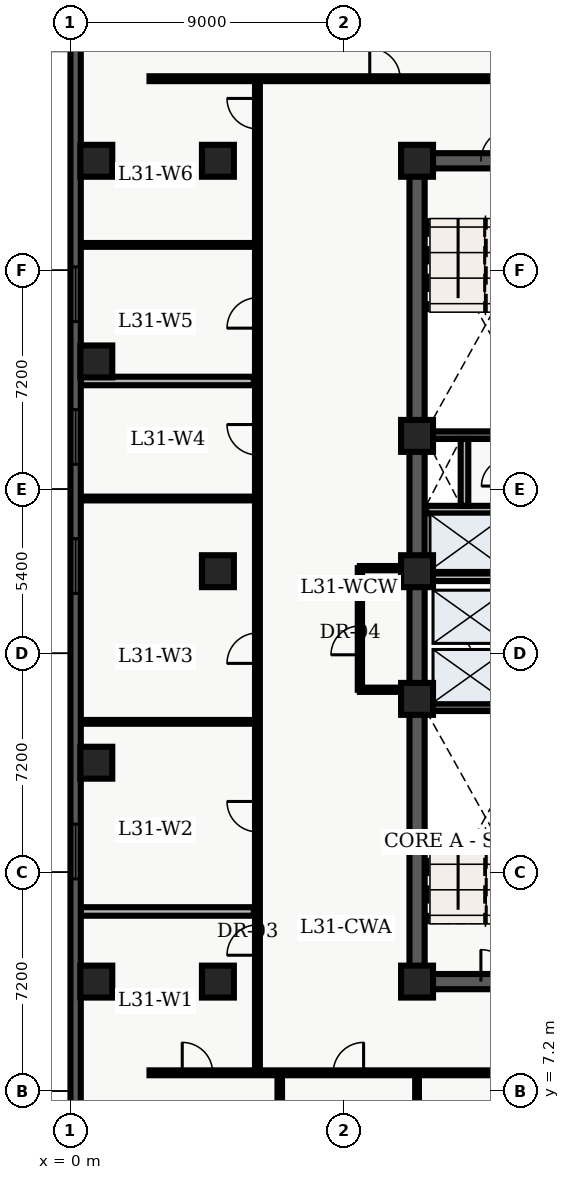
"""IFC4 building model, lengths in metres.
Left out: names, types, materials, properties, quantities, classifications, styles, units other than length and angle.
Written with IfcOpenShell. Run it as: python <this file> out.ifc"""

import sys

from ifc_helpers import new_model, entity, si_unit, converted_unit, direction, frame, origin_with_axes, origin_2d_with_axis, place, context, subcontext, project, spatial, polyline, rectangle, outline, extrude, element, fill, save


model = new_model("IFC4")
c1 = context("Model", 3, precision=1e-05, world=origin_with_axes(), true_north=direction((0.0, 1.0)))
c2 = subcontext(c1, "Body", "Model", "MODEL_VIEW")
j1 = project(units=[si_unit("LENGTHUNIT", "METRE"), converted_unit("PLANEANGLEUNIT", "DEGREE", entity("IfcPlaneAngleMeasure", 0.017), si_unit("PLANEANGLEUNIT", "RADIAN"), dimensions=[0, 0, 0, 0, 0, 0, 0])], contexts=[c1])
p1 = place(None, origin_with_axes())
s1 = spatial("IfcSite", under=j1, at=p1, CompositionType="ELEMENT")
p2 = place(p1, origin_with_axes())
s2 = spatial("IfcBuilding", under=s1, at=p2, CompositionType="ELEMENT")
p3 = place(p2, frame((0.0, 0.0, 129.0), z_axis=(0.0, 0.0, 1.0), x_axis=(1.0, 0.0, 0.0)))
s3 = spatial("IfcBuildingStorey", under=s2, at=p3, CompositionType="ELEMENT", Elevation=129.0)
p4 = place(p3, frame((11.4, 10.8, 0.0), z_axis=(0.0, 0.0, 1.0), x_axis=(0.0, 1.0, 0.0)))
e1 = element("IfcWall", 1, at=p4, inside=s3, PredefinedType="SHEAR", context=c2, shape_type="SweptSolid", body=[
    extrude(outline(polyline([(0.0, -0.25), (27.0, -0.25), (27.0, 0.25), (0.0, 0.25), (0.0, -0.25)])), origin_with_axes(), (0.0, 0.0, 1.0), 3.66),
])
p5 = place(p3, frame((11.4, 10.8, 0.0), z_axis=(0.0, 0.0, 1.0), x_axis=(1.0, 0.0, 0.0)))
e2 = element("IfcWall", 2, at=p5, inside=s3, PredefinedType="SHEAR", context=c2, shape_type="SweptSolid", body=[
    extrude(outline(polyline([(0.0, -0.25), (7.2, -0.25), (7.2, 0.25), (0.0, 0.25), (0.0, -0.25)])), origin_with_axes(), (0.0, 0.0, 1.0), 3.66),
])
p6 = place(p5, frame((2.625, 0.0, 0.0), z_axis=(0.0, 0.0, 1.0), x_axis=(1.0, 0.0, 0.0)))
e3 = element("IfcOpeningElement", 3, at=p6, cuts=e2, PredefinedType="OPENING", context=c2, shape_type="SweptSolid", body=[
    extrude(rectangle(XDim=1.05, YDim=0.52, at=origin_2d_with_axis()), origin_with_axes(), (0.0, 0.0, 1.0), 2.15),
])
p7 = place(p3, frame((11.4, 37.8, 0.0), z_axis=(0.0, 0.0, 1.0), x_axis=(1.0, 0.0, 0.0)))
e4 = element("IfcWall", 4, at=p7, inside=s3, PredefinedType="SHEAR", context=c2, shape_type="SweptSolid", body=[
    extrude(outline(polyline([(0.0, -0.25), (7.2, -0.25), (7.2, 0.25), (0.0, 0.25), (0.0, -0.25)])), origin_with_axes(), (0.0, 0.0, 1.0), 3.66),
])
p8 = place(p7, frame((2.625, 0.0, 0.0), z_axis=(0.0, 0.0, 1.0), x_axis=(1.0, 0.0, 0.0)))
e5 = element("IfcOpeningElement", 5, at=p8, cuts=e4, PredefinedType="OPENING", context=c2, shape_type="SweptSolid", body=[
    extrude(rectangle(XDim=1.05, YDim=0.52, at=origin_2d_with_axis()), origin_with_axes(), (0.0, 0.0, 1.0), 2.15),
])
for number, where, z_axis, x_axis in (
    (6, (11.65, 19.825, 0.0), (0.0, 0.0, 1.0), (1.0, 0.0, 0.0)),
    (7, (11.65, 28.775, 0.0), (0.0, 0.0, 1.0), (1.0, 0.0, 0.0)),
):
    element("IfcWall", number, at=place(p3, frame(where, z_axis=z_axis, x_axis=x_axis)), inside=s3, PredefinedType="SHEAR", context=c2, shape_type="SweptSolid", body=[
        extrude(outline(polyline([(0.0, -0.125), (6.7, -0.125), (6.7, 0.125), (0.0, 0.125), (0.0, -0.125)])), origin_with_axes(), (0.0, 0.0, 1.0), 3.66),
    ])
p9 = place(p3, frame((11.7, 24.1, 0.0), z_axis=(0.0, 0.0, 1.0), x_axis=(1.0, 0.0, 0.0)))
e8 = element("IfcWall", 8, at=p9, inside=s3, PredefinedType="SOLIDWALL", context=c2, shape_type="SweptSolid", body=[
    extrude(outline(polyline([(0.0, -0.125), (6.6, -0.125), (6.6, 0.125), (0.0, 0.125), (0.0, -0.125)])), origin_with_axes(), (0.0, 0.0, 1.0), 2.7),
])
p10 = place(p9, frame((3.75, 0.0, 0.0), z_axis=(0.0, 0.0, 1.0), x_axis=(1.0, 0.0, 0.0)))
e9 = element("IfcOpeningElement", 9, at=p10, cuts=e8, PredefinedType="OPENING", context=c2, shape_type="SweptSolid", body=[
    extrude(rectangle(XDim=0.9, YDim=0.27, at=origin_2d_with_axis()), origin_with_axes(), (0.0, 0.0, 1.0), 2.15),
])
p11 = place(p3, frame((11.7, 26.325, 0.0), z_axis=(0.0, 0.0, 1.0), x_axis=(1.0, 0.0, 0.0)))
e10 = element("IfcWall", 10, at=p11, inside=s3, PredefinedType="SOLIDWALL", context=c2, shape_type="SweptSolid", body=[
    extrude(outline(polyline([(0.0, -0.125), (6.6, -0.125), (6.6, 0.125), (0.0, 0.125), (0.0, -0.125)])), origin_with_axes(), (0.0, 0.0, 1.0), 2.7),
])
p12 = place(p11, frame((3.5, 0.0, 0.0), z_axis=(0.0, 0.0, 1.0), x_axis=(1.0, 0.0, 0.0)))
e11 = element("IfcOpeningElement", 11, at=p12, cuts=e10, PredefinedType="OPENING", context=c2, shape_type="SweptSolid", body=[
    extrude(rectangle(XDim=0.9, YDim=0.27, at=origin_2d_with_axis()), origin_with_axes(), (0.0, 0.0, 1.0), 2.15),
])
p13 = place(p3, frame((12.96, 26.45, 0.0), z_axis=(0.0, 0.0, 1.0), x_axis=(0.0, 1.0, 0.0)))
e12 = element("IfcWall", 12, at=p13, inside=s3, PredefinedType="SOLIDWALL", context=c2, shape_type="SweptSolid", body=[
    extrude(outline(polyline([(0.0, -0.125), (2.2, -0.125), (2.2, 0.125), (0.0, 0.125), (0.0, -0.125)])), origin_with_axes(), (0.0, 0.0, 1.0), 2.7),
])
for number, where, z_axis, x_axis in (
    (13, (11.4, 10.8, 0.0), (0.0, 0.0, 1.0), (1.0, 0.0, 0.0)),
    (14, (11.4, 20.1, 0.0), (0.0, 0.0, 1.0), (1.0, 0.0, 0.0)),
    (15, (11.4, 24.3, 0.0), (0.0, 0.0, 1.0), (1.0, 0.0, 0.0)),
    (16, (11.4, 28.75, 0.0), (0.0, 0.0, 1.0), (1.0, 0.0, 0.0)),
    (17, (11.4, 37.8, 0.0), (0.0, 0.0, 1.0), (1.0, 0.0, 0.0)),
    (18, (4.85, 10.8, 0.0), (0.0, 0.0, 1.0), (1.0, 0.0, 0.0)),
    (19, (4.85, 24.3, 0.0), (0.0, 0.0, 1.0), (1.0, 0.0, 0.0)),
    (20, (4.85, 37.8, 0.0), (0.0, 0.0, 1.0), (1.0, 0.0, 0.0)),
    (21, (0.85, 10.8, 0.0), (0.0, 0.0, 1.0), (1.0, 0.0, 0.0)),
    (22, (0.85, 18.0, 0.0), (0.0, 0.0, 1.0), (1.0, 0.0, 0.0)),
    (23, (0.85, 31.2, 0.0), (0.0, 0.0, 1.0), (1.0, 0.0, 0.0)),
    (24, (0.85, 37.8, 0.0), (0.0, 0.0, 1.0), (1.0, 0.0, 0.0)),
):
    element("IfcColumn", number, at=place(p3, frame(where, z_axis=z_axis, x_axis=x_axis)), inside=s3, PredefinedType="COLUMN", context=c2, shape_type="SweptSolid", body=[
        extrude(rectangle(XDim=1.05, YDim=1.05, at=origin_2d_with_axis()), origin_with_axes(), (0.0, 0.0, 1.0), 3.9),
    ])
p14 = place(p3, frame((9.52, 20.4, 0.0), z_axis=(0.0, 0.0, 1.0), x_axis=(0.0, 1.0, 0.0)))
e25 = element("IfcWall", 25, at=p14, inside=s3, PredefinedType="PARTITIONING", context=c2, shape_type="SweptSolid", body=[
    extrude(outline(polyline([(0.0, -0.07), (4.0, -0.07), (4.0, 0.07), (0.0, 0.07), (0.0, -0.07)])), origin_with_axes(), (0.0, 0.0, 1.0), 2.7),
])
p15 = place(p14, frame((1.625, 0.0, 0.0), z_axis=(0.0, 0.0, 1.0), x_axis=(1.0, 0.0, 0.0)))
e26 = element("IfcOpeningElement", 26, at=p15, cuts=e25, PredefinedType="OPENING", context=c2, shape_type="SweptSolid", body=[
    extrude(rectangle(XDim=0.95, YDim=0.16, at=origin_2d_with_axis()), origin_with_axes(), (0.0, 0.0, 1.0), 2.15),
])
for number, where, z_axis, x_axis in (
    (27, (9.52, 20.4, 0.0), (0.0, 0.0, 1.0), (1.0, 0.0, 0.0)),
    (28, (9.52, 24.4, 0.0), (0.0, 0.0, 1.0), (1.0, 0.0, 0.0)),
):
    element("IfcWall", number, at=place(p3, frame(where, z_axis=z_axis, x_axis=x_axis)), inside=s3, PredefinedType="PARTITIONING", context=c2, shape_type="SweptSolid", body=[
        extrude(outline(polyline([(0.0, -0.07), (1.58, -0.07), (1.58, 0.07), (0.0, 0.07), (0.0, -0.07)])), origin_with_axes(), (0.0, 0.0, 1.0), 2.7),
    ])
p16 = place(p3, frame((2.6, 7.8, 0.0), z_axis=(0.0, 0.0, 1.0), x_axis=(1.0, 0.0, 0.0)))
e29 = element("IfcWall", 29, at=p16, inside=s3, PredefinedType="PARTITIONING", context=c2, shape_type="SweptSolid", body=[
    extrude(outline(polyline([(0.0, -0.08), (18.55, -0.08), (18.55, 0.08), (0.0, 0.08), (0.0, -0.08)])), origin_with_axes(), (0.0, 0.0, 1.0), 2.7),
])
p17 = place(p16, frame((1.577, 0.0, 0.0), z_axis=(0.0, 0.0, 1.0), x_axis=(1.0, 0.0, 0.0)))
e30 = element("IfcOpeningElement", 30, at=p17, cuts=e29, PredefinedType="OPENING", context=c2, shape_type="SweptSolid", body=[
    extrude(rectangle(XDim=1.0, YDim=0.18, at=origin_2d_with_axis()), origin_with_axes(), (0.0, 0.0, 1.0), 2.15),
])
p18 = place(p16, frame((6.542, 0.0, 0.0), z_axis=(0.0, 0.0, 1.0), x_axis=(1.0, 0.0, 0.0)))
e31 = element("IfcOpeningElement", 31, at=p18, cuts=e29, PredefinedType="OPENING", context=c2, shape_type="SweptSolid", body=[
    extrude(rectangle(XDim=1.0, YDim=0.18, at=origin_2d_with_axis()), origin_with_axes(), (0.0, 0.0, 1.0), 2.15),
])
p19 = place(p16, frame((11.931, 0.0, 0.0), z_axis=(0.0, 0.0, 1.0), x_axis=(1.0, 0.0, 0.0)))
e32 = element("IfcOpeningElement", 32, at=p19, cuts=e29, PredefinedType="OPENING", context=c2, shape_type="SweptSolid", body=[
    extrude(rectangle(XDim=1.0, YDim=0.18, at=origin_2d_with_axis()), origin_with_axes(), (0.0, 0.0, 1.0), 2.15),
])
p20 = place(p16, frame((16.502, 0.0, 0.0), z_axis=(0.0, 0.0, 1.0), x_axis=(1.0, 0.0, 0.0)))
e33 = element("IfcOpeningElement", 33, at=p20, cuts=e29, PredefinedType="OPENING", context=c2, shape_type="SweptSolid", body=[
    extrude(rectangle(XDim=1.0, YDim=0.18, at=origin_2d_with_axis()), origin_with_axes(), (0.0, 0.0, 1.0), 2.15),
])
p21 = place(p3, frame((2.6, 40.5, 0.0), z_axis=(0.0, 0.0, 1.0), x_axis=(1.0, 0.0, 0.0)))
e34 = element("IfcWall", 34, at=p21, inside=s3, PredefinedType="PARTITIONING", context=c2, shape_type="SweptSolid", body=[
    extrude(outline(polyline([(0.0, -0.08), (18.693, -0.08), (18.693, 0.08), (0.0, 0.08), (0.0, -0.08)])), origin_with_axes(), (0.0, 0.0, 1.0), 2.7),
])
p22 = place(p21, frame((7.744, 0.0, 0.0), z_axis=(0.0, 0.0, 1.0), x_axis=(1.0, 0.0, 0.0)))
e35 = element("IfcOpeningElement", 35, at=p22, cuts=e34, PredefinedType="OPENING", context=c2, shape_type="SweptSolid", body=[
    extrude(rectangle(XDim=1.0, YDim=0.18, at=origin_2d_with_axis()), origin_with_axes(), (0.0, 0.0, 1.0), 2.15),
])
p23 = place(p3, frame((6.15, 7.8, 0.0), z_axis=(0.0, 0.0, 1.0), x_axis=(0.0, 1.0, 0.0)))
e36 = element("IfcWall", 36, at=p23, inside=s3, PredefinedType="PARTITIONING", context=c2, shape_type="SweptSolid", body=[
    extrude(outline(polyline([(0.0, -0.08), (32.7, -0.08), (32.7, 0.08), (0.0, 0.08), (0.0, -0.08)])), origin_with_axes(), (0.0, 0.0, 1.0), 2.7),
])
p24 = place(p23, frame((4.368, 0.0, 0.0), z_axis=(0.0, 0.0, 1.0), x_axis=(1.0, 0.0, 0.0)))
e37 = element("IfcOpeningElement", 37, at=p24, cuts=e36, PredefinedType="OPENING", context=c2, shape_type="SweptSolid", body=[
    extrude(rectangle(XDim=1.0, YDim=0.18, at=origin_2d_with_axis()), origin_with_axes(), (0.0, 0.0, 1.0), 2.15),
])
p25 = place(p23, frame((8.425, 0.0, 0.0), z_axis=(0.0, 0.0, 1.0), x_axis=(1.0, 0.0, 0.0)))
e38 = element("IfcOpeningElement", 38, at=p25, cuts=e36, PredefinedType="OPENING", context=c2, shape_type="SweptSolid", body=[
    extrude(rectangle(XDim=1.0, YDim=0.18, at=origin_2d_with_axis()), origin_with_axes(), (0.0, 0.0, 1.0), 2.15),
])
p26 = place(p23, frame((13.968, 0.0, 0.0), z_axis=(0.0, 0.0, 1.0), x_axis=(1.0, 0.0, 0.0)))
e39 = element("IfcOpeningElement", 39, at=p26, cuts=e36, PredefinedType="OPENING", context=c2, shape_type="SweptSolid", body=[
    extrude(rectangle(XDim=1.0, YDim=0.18, at=origin_2d_with_axis()), origin_with_axes(), (0.0, 0.0, 1.0), 2.15),
])
p27 = place(p23, frame((20.824, 0.0, 0.0), z_axis=(0.0, 0.0, 1.0), x_axis=(1.0, 0.0, 0.0)))
e40 = element("IfcOpeningElement", 40, at=p27, cuts=e36, PredefinedType="OPENING", context=c2, shape_type="SweptSolid", body=[
    extrude(rectangle(XDim=1.0, YDim=0.18, at=origin_2d_with_axis()), origin_with_axes(), (0.0, 0.0, 1.0), 2.15),
])
p28 = place(p23, frame((24.995, 0.0, 0.0), z_axis=(0.0, 0.0, 1.0), x_axis=(1.0, 0.0, 0.0)))
e41 = element("IfcOpeningElement", 41, at=p28, cuts=e36, PredefinedType="OPENING", context=c2, shape_type="SweptSolid", body=[
    extrude(rectangle(XDim=1.0, YDim=0.18, at=origin_2d_with_axis()), origin_with_axes(), (0.0, 0.0, 1.0), 2.15),
])
p29 = place(p23, frame((31.551, 0.0, 0.0), z_axis=(0.0, 0.0, 1.0), x_axis=(1.0, 0.0, 0.0)))
e42 = element("IfcOpeningElement", 42, at=p29, cuts=e36, PredefinedType="OPENING", context=c2, shape_type="SweptSolid", body=[
    extrude(rectangle(XDim=1.0, YDim=0.18, at=origin_2d_with_axis()), origin_with_axes(), (0.0, 0.0, 1.0), 2.15),
])
p30 = place(p3, frame((0.335, 13.107, 0.0), z_axis=(0.0, 0.0, 1.0), x_axis=(1.0, 0.0, 0.0)))
e43 = element("IfcWall", 43, at=p30, inside=s3, PredefinedType="PARTITIONING", context=c2, shape_type="SweptSolid", body=[
    extrude(outline(polyline([(0.0, -0.14), (5.695, -0.14), (5.695, 0.14), (0.0, 0.14), (0.0, -0.14)])), origin_with_axes(), (0.0, 0.0, 1.0), 2.7),
])
for number, where, z_axis, x_axis in (
    (44, (0.335, 19.344, 0.0), (0.0, 0.0, 1.0), (1.0, 0.0, 0.0)),
    (45, (0.335, 26.691, 0.0), (0.0, 0.0, 1.0), (1.0, 0.0, 0.0)),
):
    element("IfcWall", number, at=place(p3, frame(where, z_axis=z_axis, x_axis=x_axis)), inside=s3, PredefinedType="PARTITIONING", context=c2, shape_type="SweptSolid", body=[
        extrude(outline(polyline([(0.0, -0.062), (5.695, -0.062), (5.695, 0.062), (0.0, 0.062), (0.0, -0.062)])), origin_with_axes(), (0.0, 0.0, 1.0), 2.7),
    ])
p31 = place(p3, frame((0.335, 30.557, 0.0), z_axis=(0.0, 0.0, 1.0), x_axis=(1.0, 0.0, 0.0)))
e46 = element("IfcWall", 46, at=p31, inside=s3, PredefinedType="PARTITIONING", context=c2, shape_type="SweptSolid", body=[
    extrude(outline(polyline([(0.0, -0.14), (5.695, -0.14), (5.695, 0.14), (0.0, 0.14), (0.0, -0.14)])), origin_with_axes(), (0.0, 0.0, 1.0), 2.7),
])
p32 = place(p3, frame((0.335, 35.033, 0.0), z_axis=(0.0, 0.0, 1.0), x_axis=(1.0, 0.0, 0.0)))
e47 = element("IfcWall", 47, at=p32, inside=s3, PredefinedType="PARTITIONING", context=c2, shape_type="SweptSolid", body=[
    extrude(outline(polyline([(0.0, -0.062), (5.695, -0.062), (5.695, 0.062), (0.0, 0.062), (0.0, -0.062)])), origin_with_axes(), (0.0, 0.0, 1.0), 2.7),
])
p33 = place(p3, frame((6.884, 0.335, 0.0), z_axis=(0.0, 0.0, 1.0), x_axis=(0.0, 1.0, 0.0)))
e48 = element("IfcWall", 48, at=p33, inside=s3, PredefinedType="PARTITIONING", context=c2, shape_type="SweptSolid", body=[
    extrude(outline(polyline([(0.0, -0.075), (7.365, -0.075), (7.365, 0.075), (0.0, 0.075), (0.0, -0.075)])), origin_with_axes(), (0.0, 0.0, 1.0), 2.7),
])
p34 = place(p3, frame((11.4, 0.335, 0.0), z_axis=(0.0, 0.0, 1.0), x_axis=(0.0, 1.0, 0.0)))
e49 = element("IfcWall", 49, at=p34, inside=s3, PredefinedType="PARTITIONING", context=c2, shape_type="SweptSolid", body=[
    extrude(outline(polyline([(0.0, -0.062), (7.365, -0.062), (7.365, 0.062), (0.0, 0.062), (0.0, -0.062)])), origin_with_axes(), (0.0, 0.0, 1.0), 2.7),
])
p35 = place(p3, frame((0.17, 2.74, 0.0), z_axis=(0.0, 0.0, 1.0), x_axis=(0.0, 1.0, 0.0)))
e50 = element("IfcWall", 50, at=p35, inside=s3, PredefinedType="SOLIDWALL", context=c2, shape_type="SweptSolid", body=[
    extrude(outline(polyline([(0.0, -0.17), (43.46, -0.17), (43.46, 0.17), (0.0, 0.17), (0.0, -0.17)])), origin_with_axes(), (0.0, 0.0, 1.0), 3.66),
])
p36 = place(p35, frame((2.948, 0.0, 0.45), z_axis=(0.0, 0.0, 1.0), x_axis=(1.0, 0.0, 0.0)))
e51 = element("IfcOpeningElement", 51, at=p36, cuts=e50, PredefinedType="OPENING", context=c2, shape_type="SweptSolid", body=[
    extrude(rectangle(XDim=1.8, YDim=0.36, at=origin_2d_with_axis()), origin_with_axes(), (0.0, 0.0, 1.0), 2.1),
])
p37 = place(p35, frame((12.339, 0.0, 0.45), z_axis=(0.0, 0.0, 1.0), x_axis=(1.0, 0.0, 0.0)))
e52 = element("IfcOpeningElement", 52, at=p37, cuts=e50, PredefinedType="OPENING", context=c2, shape_type="SweptSolid", body=[
    extrude(rectangle(XDim=1.8, YDim=0.36, at=origin_2d_with_axis()), origin_with_axes(), (0.0, 0.0, 1.0), 2.1),
])
p38 = place(p35, frame((21.73, 0.0, 0.45), z_axis=(0.0, 0.0, 1.0), x_axis=(1.0, 0.0, 0.0)))
e53 = element("IfcOpeningElement", 53, at=p38, cuts=e50, PredefinedType="OPENING", context=c2, shape_type="SweptSolid", body=[
    extrude(rectangle(XDim=1.8, YDim=0.36, at=origin_2d_with_axis()), origin_with_axes(), (0.0, 0.0, 1.0), 2.1),
])
p39 = place(p35, frame((25.976, 0.0, 0.45), z_axis=(0.0, 0.0, 1.0), x_axis=(1.0, 0.0, 0.0)))
e54 = element("IfcOpeningElement", 54, at=p39, cuts=e50, PredefinedType="OPENING", context=c2, shape_type="SweptSolid", body=[
    extrude(rectangle(XDim=1.8, YDim=0.36, at=origin_2d_with_axis()), origin_with_axes(), (0.0, 0.0, 1.0), 2.1),
])
p40 = place(p35, frame((30.671, 0.0, 0.45), z_axis=(0.0, 0.0, 1.0), x_axis=(1.0, 0.0, 0.0)))
e55 = element("IfcOpeningElement", 55, at=p40, cuts=e50, PredefinedType="OPENING", context=c2, shape_type="SweptSolid", body=[
    extrude(rectangle(XDim=1.8, YDim=0.36, at=origin_2d_with_axis()), origin_with_axes(), (0.0, 0.0, 1.0), 2.1),
])
p41 = place(p35, frame((40.062, 0.0, 0.45), z_axis=(0.0, 0.0, 1.0), x_axis=(1.0, 0.0, 0.0)))
e56 = element("IfcOpeningElement", 56, at=p41, cuts=e50, PredefinedType="OPENING", context=c2, shape_type="SweptSolid", body=[
    extrude(rectangle(XDim=1.8, YDim=0.36, at=origin_2d_with_axis()), origin_with_axes(), (0.0, 0.0, 1.0), 2.1),
])
p42 = place(p5, frame((2.625, 0.0, 0.0), z_axis=(0.0, 0.0, 1.0), x_axis=(1.0, 0.0, 0.0)))
e57 = element("IfcDoor", 57, at=p42, inside=s3, OperationType="SINGLE_SWING_LEFT", PredefinedType="DOOR", context=c2, shape_type="SweptSolid", body=[
    extrude(rectangle(XDim=1.05, YDim=0.09, at=origin_2d_with_axis()), origin_with_axes(), (0.0, 0.0, 1.0), 2.15),
])
fill(e3, e57)
p43 = place(p7, frame((2.625, 0.0, 0.0), z_axis=(0.0, 0.0, 1.0), x_axis=(1.0, 0.0, 0.0)))
e58 = element("IfcDoor", 58, at=p43, inside=s3, OperationType="SINGLE_SWING_RIGHT", PredefinedType="DOOR", context=c2, shape_type="SweptSolid", body=[
    extrude(rectangle(XDim=1.05, YDim=0.09, at=origin_2d_with_axis()), origin_with_axes(), (0.0, 0.0, 1.0), 2.15),
])
fill(e5, e58)
p44 = place(p14, frame((1.625, 0.0, 0.0), z_axis=(0.0, 0.0, 1.0), x_axis=(1.0, 0.0, 0.0)))
e59 = element("IfcDoor", 59, at=p44, inside=s3, OperationType="SINGLE_SWING_LEFT", PredefinedType="DOOR", context=c2, shape_type="SweptSolid", body=[
    extrude(rectangle(XDim=0.95, YDim=0.084, at=origin_2d_with_axis()), origin_with_axes(), (0.0, 0.0, 1.0), 2.15),
])
fill(e26, e59)
p45 = place(p23, frame((4.368, 0.0, 0.0), z_axis=(0.0, 0.0, 1.0), x_axis=(1.0, 0.0, 0.0)))
e60 = element("IfcDoor", 60, at=p45, inside=s3, OperationType="SINGLE_SWING_LEFT", PredefinedType="DOOR", context=c2, shape_type="SweptSolid", body=[
    extrude(rectangle(XDim=1.0, YDim=0.09, at=origin_2d_with_axis()), origin_with_axes(), (0.0, 0.0, 1.0), 2.15),
])
fill(e37, e60)
p46 = place(p23, frame((8.425, 0.0, 0.0), z_axis=(0.0, 0.0, 1.0), x_axis=(1.0, 0.0, 0.0)))
e61 = element("IfcDoor", 61, at=p46, inside=s3, OperationType="SINGLE_SWING_RIGHT", PredefinedType="DOOR", context=c2, shape_type="SweptSolid", body=[
    extrude(rectangle(XDim=1.0, YDim=0.09, at=origin_2d_with_axis()), origin_with_axes(), (0.0, 0.0, 1.0), 2.15),
])
fill(e38, e61)
p47 = place(p23, frame((13.968, 0.0, 0.0), z_axis=(0.0, 0.0, 1.0), x_axis=(1.0, 0.0, 0.0)))
e62 = element("IfcDoor", 62, at=p47, inside=s3, OperationType="SINGLE_SWING_LEFT", PredefinedType="DOOR", context=c2, shape_type="SweptSolid", body=[
    extrude(rectangle(XDim=1.0, YDim=0.09, at=origin_2d_with_axis()), origin_with_axes(), (0.0, 0.0, 1.0), 2.15),
])
fill(e39, e62)
p48 = place(p23, frame((20.824, 0.0, 0.0), z_axis=(0.0, 0.0, 1.0), x_axis=(1.0, 0.0, 0.0)))
e63 = element("IfcDoor", 63, at=p48, inside=s3, OperationType="SINGLE_SWING_RIGHT", PredefinedType="DOOR", context=c2, shape_type="SweptSolid", body=[
    extrude(rectangle(XDim=1.0, YDim=0.09, at=origin_2d_with_axis()), origin_with_axes(), (0.0, 0.0, 1.0), 2.15),
])
fill(e40, e63)
p49 = place(p23, frame((24.995, 0.0, 0.0), z_axis=(0.0, 0.0, 1.0), x_axis=(1.0, 0.0, 0.0)))
e64 = element("IfcDoor", 64, at=p49, inside=s3, OperationType="SINGLE_SWING_LEFT", PredefinedType="DOOR", context=c2, shape_type="SweptSolid", body=[
    extrude(rectangle(XDim=1.0, YDim=0.09, at=origin_2d_with_axis()), origin_with_axes(), (0.0, 0.0, 1.0), 2.15),
])
fill(e41, e64)
p50 = place(p23, frame((31.551, 0.0, 0.0), z_axis=(0.0, 0.0, 1.0), x_axis=(1.0, 0.0, 0.0)))
e65 = element("IfcDoor", 65, at=p50, inside=s3, OperationType="SINGLE_SWING_RIGHT", PredefinedType="DOOR", context=c2, shape_type="SweptSolid", body=[
    extrude(rectangle(XDim=1.0, YDim=0.09, at=origin_2d_with_axis()), origin_with_axes(), (0.0, 0.0, 1.0), 2.15),
])
fill(e42, e65)
p51 = place(p16, frame((1.577, 0.0, 0.0), z_axis=(0.0, 0.0, 1.0), x_axis=(1.0, 0.0, 0.0)))
e66 = element("IfcDoor", 66, at=p51, inside=s3, OperationType="SINGLE_SWING_LEFT", PredefinedType="DOOR", context=c2, shape_type="SweptSolid", body=[
    extrude(rectangle(XDim=1.0, YDim=0.09, at=origin_2d_with_axis()), origin_with_axes(), (0.0, 0.0, 1.0), 2.15),
])
fill(e30, e66)
p52 = place(p16, frame((6.542, 0.0, 0.0), z_axis=(0.0, 0.0, 1.0), x_axis=(1.0, 0.0, 0.0)))
e67 = element("IfcDoor", 67, at=p52, inside=s3, OperationType="SINGLE_SWING_RIGHT", PredefinedType="DOOR", context=c2, shape_type="SweptSolid", body=[
    extrude(rectangle(XDim=1.0, YDim=0.09, at=origin_2d_with_axis()), origin_with_axes(), (0.0, 0.0, 1.0), 2.15),
])
fill(e31, e67)
p53 = place(p21, frame((7.744, 0.0, 0.0), z_axis=(0.0, 0.0, 1.0), x_axis=(1.0, 0.0, 0.0)))
e68 = element("IfcDoor", 68, at=p53, inside=s3, OperationType="SINGLE_SWING_LEFT", PredefinedType="DOOR", context=c2, shape_type="SweptSolid", body=[
    extrude(rectangle(XDim=1.0, YDim=0.09, at=origin_2d_with_axis()), origin_with_axes(), (0.0, 0.0, 1.0), 2.15),
])
fill(e35, e68)
p54 = place(p35, frame((12.339, 0.0, 0.45), z_axis=(0.0, 0.0, 1.0), x_axis=(1.0, 0.0, 0.0)))
e69 = element("IfcWindow", 69, at=p54, inside=s3, PredefinedType="WINDOW", context=c2, shape_type="SweptSolid", body=[
    extrude(rectangle(XDim=1.8, YDim=0.09, at=origin_2d_with_axis()), origin_with_axes(), (0.0, 0.0, 1.0), 2.1),
])
fill(e52, e69)
p55 = place(p35, frame((21.73, 0.0, 0.45), z_axis=(0.0, 0.0, 1.0), x_axis=(1.0, 0.0, 0.0)))
e70 = element("IfcWindow", 70, at=p55, inside=s3, PredefinedType="WINDOW", context=c2, shape_type="SweptSolid", body=[
    extrude(rectangle(XDim=1.8, YDim=0.09, at=origin_2d_with_axis()), origin_with_axes(), (0.0, 0.0, 1.0), 2.1),
])
fill(e53, e70)
p56 = place(p35, frame((25.976, 0.0, 0.45), z_axis=(0.0, 0.0, 1.0), x_axis=(1.0, 0.0, 0.0)))
e71 = element("IfcWindow", 71, at=p56, inside=s3, PredefinedType="WINDOW", context=c2, shape_type="SweptSolid", body=[
    extrude(rectangle(XDim=1.8, YDim=0.09, at=origin_2d_with_axis()), origin_with_axes(), (0.0, 0.0, 1.0), 2.1),
])
fill(e54, e71)
p57 = place(p35, frame((30.671, 0.0, 0.45), z_axis=(0.0, 0.0, 1.0), x_axis=(1.0, 0.0, 0.0)))
e72 = element("IfcWindow", 72, at=p57, inside=s3, PredefinedType="WINDOW", context=c2, shape_type="SweptSolid", body=[
    extrude(rectangle(XDim=1.8, YDim=0.09, at=origin_2d_with_axis()), origin_with_axes(), (0.0, 0.0, 1.0), 2.1),
])
fill(e55, e72)
save(model, sys.argv[1])
